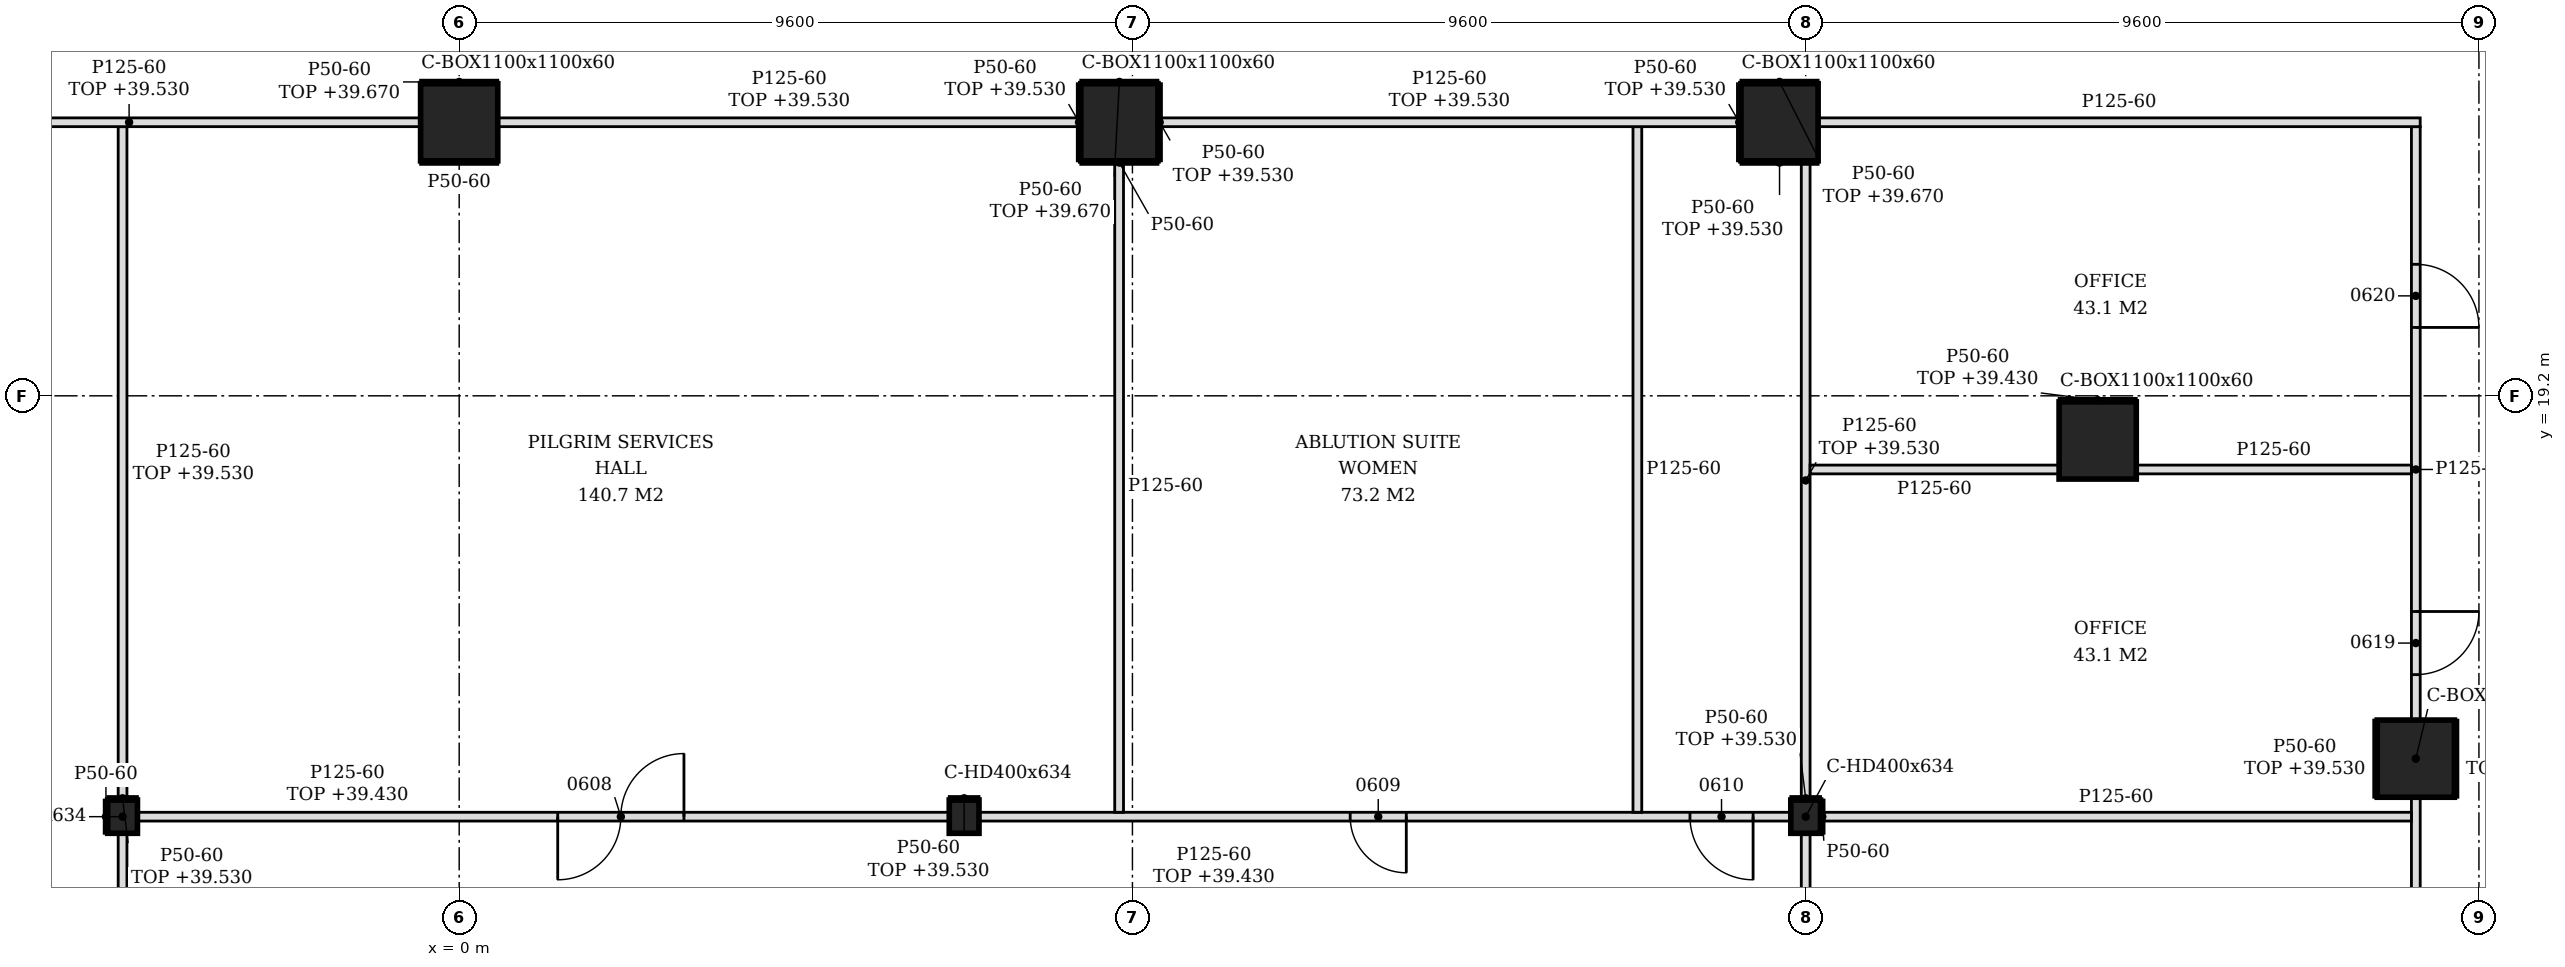
"""IFC4 building model, lengths in metres.
Left out: names, types, materials, properties, quantities, classifications, styles, units other than length and angle.
Written with IfcOpenShell. Run it as: python <this file> out.ifc"""

import sys

from ifc_helpers import new_model, si_unit, direction, frame, frame_2d, origin, origin_2d, place, context, subcontext, project, spatial, polyline, rectangle, hollow_rectangle, i_section, outline, extrude, element, fill, save


model = new_model("IFC4")
c1 = context("Model", 3, precision=1e-05, world=origin(), true_north=direction((0.0, 1.0)))
c2 = subcontext(c1, "Body", "Model", "MODEL_VIEW")
j1 = project(units=[si_unit("LENGTHUNIT", "METRE"), si_unit("PLANEANGLEUNIT", "RADIAN")], contexts=[c1])
p1 = place(None, origin())
s1 = spatial("IfcSite", under=j1, at=p1, CompositionType="ELEMENT")
p2 = place(p1, origin())
s2 = spatial("IfcBuilding", under=s1, at=p2, CompositionType="ELEMENT")
p3 = place(p2, frame((0.0, 0.0, 35.4)))
s3 = spatial("IfcBuildingStorey", under=s2, at=p3, CompositionType="ELEMENT", Elevation=35.4)
for number, where, z_axis, x_axis in (
    (1, (27.9, 14.027, -0.2), (0.0, 0.0, 1.0), (1.0, 0.0, 0.0)),
    (2, (23.364, 18.564, -0.2), (0.0, 0.0, 1.0), (1.0, 0.0, 0.0)),
    (3, (18.827, 23.1, -0.2), (0.0, 0.0, 1.0), (1.0, 0.0, 0.0)),
    (4, (9.414, 23.1, -0.2), (0.0, 0.0, 1.0), (1.0, 0.0, 0.0)),
    (5, (0.0, 23.1, -0.2), (0.0, 0.0, 1.0), (1.0, 0.0, 0.0)),
):
    element("IfcColumn", number, at=place(p3, frame(where, z_axis=z_axis, x_axis=x_axis)), inside=s3, PredefinedType="COLUMN", context=c2, shape_type="SweptSolid", body=[
        extrude(hollow_rectangle(XDim=1.1, YDim=1.1, WallThickness=0.06, at=origin_2d()), origin(), (0.0, 0.0, 1.0), 4.85),
    ])
for number, where, z_axis, x_axis in (
    (6, (-4.8, 13.2, -0.2), (0.0, 0.0, 1.0), (1.0, 0.0, 0.0)),
    (7, (7.2, 13.2, -0.2), (0.0, 0.0, 1.0), (1.0, 0.0, 0.0)),
    (8, (19.2, 13.2, -0.2), (0.0, 0.0, 1.0), (1.0, 0.0, 0.0)),
):
    element("IfcColumn", number, at=place(p3, frame(where, z_axis=z_axis, x_axis=x_axis)), inside=s3, PredefinedType="COLUMN", context=c2, shape_type="SweptSolid", body=[
        extrude(i_section(OverallWidth=0.424, OverallDepth=0.474, WebThickness=0.048, FlangeThickness=0.077, FilletRadius=0.015, at=origin_2d()), origin(), (0.0, 0.0, 1.0), 4.85),
    ])
for number, where, z_axis, x_axis in (
    (9, (-4.8, 7.863, 0.0), (0.0, 0.0, 1.0), (0.0, 1.0, 0.0)),
    (10, (19.2, 7.863, 0.0), (0.0, 0.0, 1.0), (0.0, 1.0, 0.0)),
):
    element("IfcWall", number, at=place(p3, frame(where, z_axis=z_axis, x_axis=x_axis)), inside=s3, PredefinedType="PARTITIONING", context=c2, shape_type="SweptSolid", body=[
        extrude(rectangle(XDim=5.1, YDim=0.125, at=frame_2d((2.55, 0.0))), origin(), (0.0, 0.0, 1.0), 4.03),
    ])
p4 = place(p3, frame((27.9, 7.863, 0.0), z_axis=(0.0, 0.0, 1.0), x_axis=(0.0, 1.0, 0.0)))
e11 = element("IfcWall", 11, at=p4, inside=s3, PredefinedType="PARTITIONING", context=c2, shape_type="SweptSolid", body=[
    extrude(rectangle(XDim=5.615, YDim=0.125, at=frame_2d((2.807, 0.0))), origin(), (0.0, 0.0, 1.0), 4.13),
])
p5 = place(p3, frame((-4.588, 13.2, 0.0), z_axis=(0.0, 0.0, 1.0), x_axis=(1.0, 0.0, 0.0)))
e12 = element("IfcWall", 12, at=p5, inside=s3, PredefinedType="PARTITIONING", context=c2, shape_type="SweptSolid", body=[
    extrude(rectangle(XDim=11.576, YDim=0.125, at=frame_2d((5.788, 0.0))), origin(), (0.0, 0.0, 1.0), 4.03),
])
p6 = place(p5, frame((5.993, 0.0, 0.0)))
e13 = element("IfcOpeningElement", 13, at=p6, cuts=e12, PredefinedType="OPENING", context=c2, shape_type="SweptSolid", body=[
    extrude(rectangle(XDim=1.8, YDim=2.1, at=frame_2d((0.9, 1.05))), frame((0.0, 0.073, 0.0), z_axis=(0.0, -1.0, 0.0), x_axis=(1.0, 0.0, 0.0)), (0.0, 0.0, 1.0), 0.145),
])
p7 = place(p3, frame((7.412, 13.2, 0.0), z_axis=(0.0, 0.0, 1.0), x_axis=(1.0, 0.0, 0.0)))
e14 = element("IfcWall", 14, at=p7, inside=s3, PredefinedType="PARTITIONING", context=c2, shape_type="SweptSolid", body=[
    extrude(rectangle(XDim=11.576, YDim=0.125, at=frame_2d((5.788, 0.0))), origin(), (0.0, 0.0, 1.0), 4.03),
])
p8 = place(p7, frame((5.293, 0.0, 0.0)))
e15 = element("IfcOpeningElement", 15, at=p8, cuts=e14, PredefinedType="OPENING", context=c2, shape_type="SweptSolid", body=[
    extrude(rectangle(XDim=0.8, YDim=2.1, at=frame_2d((0.4, 1.05))), frame((0.0, 0.073, 0.0), z_axis=(0.0, -1.0, 0.0), x_axis=(1.0, 0.0, 0.0)), (0.0, 0.0, 1.0), 0.145),
])
p9 = place(p7, frame((10.138, 0.0, 0.0)))
e16 = element("IfcOpeningElement", 16, at=p9, cuts=e14, PredefinedType="OPENING", context=c2, shape_type="SweptSolid", body=[
    extrude(rectangle(XDim=0.9, YDim=2.1, at=frame_2d((0.45, 1.05))), frame((0.0, 0.073, 0.0), z_axis=(0.0, -1.0, 0.0), x_axis=(1.0, 0.0, 0.0)), (0.0, 0.0, 1.0), 0.145),
])
p10 = place(p3, frame((19.412, 13.2, 0.0), z_axis=(0.0, 0.0, 1.0), x_axis=(1.0, 0.0, 0.0)))
e17 = element("IfcWall", 17, at=p10, inside=s3, PredefinedType="PARTITIONING", context=c2, shape_type="SweptSolid", body=[
    extrude(outline(polyline([(0.0, 0.0), (8.425, 0.0), (8.426, 4.13), (8.338, 4.13), (8.336, 4.65), (0.0, 4.65), (0.0, 0.0)])), frame((0.0, 0.062, 0.0), z_axis=(0.0, -1.0, 0.0), x_axis=(1.0, 0.0, 0.0)), (0.0, 0.0, 1.0), 0.125),
])
p11 = place(p3, frame((9.41, 13.262, 0.0), z_axis=(0.0, 0.0, 1.0), x_axis=(0.0, 1.0, 0.0)))
e18 = element("IfcWall", 18, at=p11, inside=s3, PredefinedType="PARTITIONING", context=c2, shape_type="SweptSolid", body=[
    extrude(outline(polyline([(0.0, 0.0), (9.288, 0.0), (9.288, 4.65), (6.042, 4.65), (6.041, 4.08), (5.833, 4.08), (5.831, 4.65), (0.087, 4.65), (0.085, 4.03), (0.0, 4.03), (0.0, 0.0)])), frame((0.0, 0.062, 0.0), z_axis=(0.0, -1.0, 0.0), x_axis=(1.0, 0.0, 0.0)), (0.0, 0.0, 1.0), 0.125),
])
p12 = place(p3, frame((16.8, 13.262, 0.0), z_axis=(0.0, 0.0, 1.0), x_axis=(0.0, 1.0, 0.0)))
e19 = element("IfcWall", 19, at=p12, inside=s3, PredefinedType="PARTITIONING", context=c2, shape_type="SweptSolid", body=[
    extrude(outline(polyline([(0.0, 0.0), (9.775, 0.0), (9.775, 4.13), (9.688, 4.13), (9.686, 4.65), (6.042, 4.65), (6.041, 4.08), (5.833, 4.08), (5.831, 4.65), (0.087, 4.65), (0.085, 4.03), (0.0, 4.03), (0.0, 0.0)])), frame((0.0, 0.062, 0.0), z_axis=(0.0, -1.0, 0.0), x_axis=(1.0, 0.0, 0.0)), (0.0, 0.0, 1.0), 0.125),
])
p13 = place(p3, frame((-4.8, 13.437, 0.0), z_axis=(0.0, 0.0, 1.0), x_axis=(0.0, 1.0, 0.0)))
e20 = element("IfcWall", 20, at=p13, inside=s3, PredefinedType="PARTITIONING", context=c2, shape_type="SweptSolid", body=[
    extrude(rectangle(XDim=9.601, YDim=0.125, at=frame_2d((4.8, 0.0))), origin(), (0.0, 0.0, 1.0), 4.13),
])
p14 = place(p3, frame((19.2, 13.437, 0.0), z_axis=(0.0, 0.0, 1.0), x_axis=(0.0, 1.0, 0.0)))
e21 = element("IfcWall", 21, at=p14, inside=s3, PredefinedType="PARTITIONING", context=c2, shape_type="SweptSolid", body=[
    extrude(rectangle(XDim=9.113, YDim=0.125, at=frame_2d((4.557, 0.0))), origin(), (0.0, 0.0, 1.0), 4.13),
])
p15 = place(p3, frame((27.9, 14.577, 0.0), z_axis=(0.0, 0.0, 1.0), x_axis=(0.0, 1.0, 0.0)))
e22 = element("IfcWall", 22, at=p15, inside=s3, PredefinedType="PARTITIONING", context=c2, shape_type="SweptSolid", body=[
    extrude(outline(polyline([(0.0, 0.0), (8.46, 0.0), (8.46, 4.65), (4.773, 4.65), (4.771, 4.03), (4.473, 4.03), (4.471, 4.65), (0.0, 4.65), (0.0, 0.0)])), frame((0.0, 0.062, 0.0), z_axis=(0.0, -1.0, 0.0), x_axis=(1.0, 0.0, 0.0)), (0.0, 0.0, 1.0), 0.125),
])
p16 = place(p15, frame((0.648, 0.0, 0.0)))
e23 = element("IfcOpeningElement", 23, at=p16, cuts=e22, PredefinedType="OPENING", context=c2, shape_type="SweptSolid", body=[
    extrude(rectangle(XDim=0.9, YDim=2.1, at=frame_2d((0.45, 1.05))), frame((0.0, 0.073, 0.0), z_axis=(0.0, -1.0, 0.0), x_axis=(1.0, 0.0, 0.0)), (0.0, 0.0, 1.0), 0.145),
])
p17 = place(p15, frame((5.598, 0.0, 0.0)))
e24 = element("IfcOpeningElement", 24, at=p17, cuts=e22, PredefinedType="OPENING", context=c2, shape_type="SweptSolid", body=[
    extrude(rectangle(XDim=0.9, YDim=2.1, at=frame_2d((0.45, 1.05))), frame((0.0, 0.073, 0.0), z_axis=(0.0, -1.0, 0.0), x_axis=(1.0, 0.0, 0.0)), (0.0, 0.0, 1.0), 0.145),
])
p18 = place(p3, frame((19.262, 18.15, 0.0), z_axis=(0.0, 0.0, 1.0), x_axis=(1.0, 0.0, 0.0)))
e25 = element("IfcWall", 25, at=p18, inside=s3, PredefinedType="PARTITIONING", context=c2, shape_type="SweptSolid", body=[
    extrude(outline(polyline([(0.0, 0.0), (3.551, 0.0), (3.551, 4.65), (0.087, 4.65), (0.085, 4.13), (0.0, 4.13), (0.0, 0.0)])), frame((0.0, 0.062, 0.0), z_axis=(0.0, -1.0, 0.0), x_axis=(1.0, 0.0, 0.0)), (0.0, 0.0, 1.0), 0.125),
])
p19 = place(p3, frame((23.914, 18.15, 0.0), z_axis=(0.0, 0.0, 1.0), x_axis=(1.0, 0.0, 0.0)))
e26 = element("IfcWall", 26, at=p19, inside=s3, PredefinedType="PARTITIONING", context=c2, shape_type="SweptSolid", body=[
    extrude(outline(polyline([(0.0, 0.0), (3.924, 0.0), (3.924, 4.65), (0.138, 4.65), (0.136, 4.13), (0.0, 4.13), (0.0, 0.0)])), frame((0.0, 0.062, 0.0), z_axis=(0.0, -1.0, 0.0), x_axis=(1.0, 0.0, 0.0)), (0.0, 0.0, 1.0), 0.125),
])
for number, where, z_axis, x_axis in (
    (27, (-8.864, 23.1, 0.0), (0.0, 0.0, 1.0), (1.0, 0.0, 0.0)),
    (28, (0.55, 23.1, 0.0), (0.0, 0.0, 1.0), (1.0, 0.0, 0.0)),
    (29, (9.964, 23.1, 0.0), (0.0, 0.0, 1.0), (1.0, 0.0, 0.0)),
):
    element("IfcWall", number, at=place(p3, frame(where, z_axis=z_axis, x_axis=x_axis)), inside=s3, PredefinedType="PARTITIONING", context=c2, shape_type="SweptSolid", body=[
        extrude(rectangle(XDim=8.313, YDim=0.125, at=frame_2d((4.157, 0.0))), origin(), (0.0, 0.0, 1.0), 4.13),
    ])
p20 = place(p3, frame((19.377, 23.1, 0.0), z_axis=(0.0, 0.0, 1.0), x_axis=(1.0, 0.0, 0.0)))
e30 = element("IfcWall", 30, at=p20, inside=s3, PredefinedType="PARTITIONING", context=c2, shape_type="SweptSolid", body=[
    extrude(rectangle(XDim=8.585, YDim=0.125, at=frame_2d((4.292, 0.0))), origin(), (0.0, 0.0, 1.0), 4.65),
])
for number, where, z_axis, x_axis in (
    (31, (-5.037, 12.963, 0.0), (0.0, 0.0, 1.0), (0.0, 1.0, 0.0)),
    (32, (19.437, 12.963, 0.0), (0.0, 0.0, 1.0), (0.0, 1.0, 0.0)),
):
    element("IfcWall", number, at=place(p3, frame(where, z_axis=z_axis, x_axis=x_axis)), inside=s3, PredefinedType="PARTITIONING", context=c2, shape_type="SweptSolid", body=[
        extrude(rectangle(XDim=0.474, YDim=0.05, at=frame_2d((0.237, 0.0))), origin(), (0.0, 0.0, 1.0), 4.65),
    ])
for number, where, z_axis, x_axis in (
    (33, (27.325, 13.477, 0.0), (0.0, 0.0, 1.0), (0.0, 1.0, 0.0)),
    (34, (28.475, 13.477, 0.0), (0.0, 0.0, 1.0), (0.0, 1.0, 0.0)),
):
    element("IfcWall", number, at=place(p3, frame(where, z_axis=z_axis, x_axis=x_axis)), inside=s3, PredefinedType="PARTITIONING", context=c2, shape_type="SweptSolid", body=[
        extrude(rectangle(XDim=1.1, YDim=0.05, at=frame_2d((0.55, 0.0))), origin(), (0.0, 0.0, 1.0), 4.13),
    ])
for number, where, z_axis, x_axis in (
    (35, (-5.012, 13.462, 0.0), (0.0, 0.0, 1.0), (1.0, 0.0, 0.0)),
    (36, (6.988, 13.462, 0.0), (0.0, 0.0, 1.0), (1.0, 0.0, 0.0)),
    (37, (18.988, 13.462, 0.0), (0.0, 0.0, 1.0), (1.0, 0.0, 0.0)),
):
    element("IfcWall", number, at=place(p3, frame(where, z_axis=z_axis, x_axis=x_axis)), inside=s3, PredefinedType="PARTITIONING", context=c2, shape_type="SweptSolid", body=[
        extrude(rectangle(XDim=0.424, YDim=0.05, at=frame_2d((0.212, 0.0))), origin(), (0.0, 0.0, 1.0), 4.13),
    ])
for number, where, z_axis, x_axis in (
    (38, (9.989, 22.55, 0.0), (0.0, 0.0, 1.0), (0.0, 1.0, 0.0)),
    (39, (8.839, 22.55, 0.0), (0.0, 0.0, 1.0), (0.0, 1.0, 0.0)),
    (40, (18.252, 22.55, 0.0), (0.0, 0.0, 1.0), (0.0, 1.0, 0.0)),
):
    element("IfcWall", number, at=place(p3, frame(where, z_axis=z_axis, x_axis=x_axis)), inside=s3, PredefinedType="PARTITIONING", context=c2, shape_type="SweptSolid", body=[
        extrude(rectangle(XDim=1.1, YDim=0.05, at=frame_2d((0.55, 0.0))), origin(), (0.0, 0.0, 1.0), 4.13),
    ])
p21 = place(p3, frame((22.814, 19.139, 0.0), z_axis=(0.0, 0.0, 1.0), x_axis=(1.0, 0.0, 0.0)))
e41 = element("IfcWall", 41, at=p21, inside=s3, PredefinedType="PARTITIONING", context=c2, shape_type="SweptSolid", body=[
    extrude(rectangle(XDim=1.1, YDim=0.05, at=frame_2d((0.55, 0.0))), origin(), (0.0, 0.0, 1.0), 4.03),
])
p22 = place(p3, frame((-0.55, 22.525, 0.0), z_axis=(0.0, 0.0, 1.0), x_axis=(1.0, 0.0, 0.0)))
e42 = element("IfcWall", 42, at=p22, inside=s3, PredefinedType="PARTITIONING", context=c2, shape_type="SweptSolid", body=[
    extrude(rectangle(XDim=1.1, YDim=0.05, at=frame_2d((0.55, 0.0))), origin(), (0.0, 0.0, 1.0), 4.65),
])
for number, where, z_axis, x_axis in (
    (43, (-0.55, 23.675, 0.0), (0.0, 0.0, 1.0), (1.0, 0.0, 0.0)),
    (44, (8.864, 23.675, 0.0), (0.0, 0.0, 1.0), (1.0, 0.0, 0.0)),
):
    element("IfcWall", number, at=place(p3, frame(where, z_axis=z_axis, x_axis=x_axis)), inside=s3, PredefinedType="PARTITIONING", context=c2, shape_type="SweptSolid", body=[
        extrude(rectangle(XDim=1.1, YDim=0.05, at=frame_2d((0.55, 0.0))), origin(), (0.0, 0.0, 1.0), 4.27),
    ])
p23 = place(p3, frame((8.864, 22.525, 0.0), z_axis=(0.0, 0.0, 1.0), x_axis=(1.0, 0.0, 0.0)))
e45 = element("IfcWall", 45, at=p23, inside=s3, PredefinedType="PARTITIONING", context=c2, shape_type="SweptSolid", body=[
    extrude(rectangle(XDim=1.1, YDim=0.05, at=frame_2d((0.55, 0.0))), origin(), (0.0, 0.0, 1.0), 4.65),
])
p24 = place(p3, frame((18.277, 22.525, 0.0), z_axis=(0.0, 0.0, 1.0), x_axis=(1.0, 0.0, 0.0)))
e46 = element("IfcWall", 46, at=p24, inside=s3, PredefinedType="PARTITIONING", context=c2, shape_type="SweptSolid", body=[
    extrude(rectangle(XDim=1.1, YDim=0.05, at=frame_2d((0.55, 0.0))), origin(), (0.0, 0.0, 1.0), 4.13),
])
p25 = place(p3, frame((18.277, 23.675, 0.0), z_axis=(0.0, 0.0, 1.0), x_axis=(1.0, 0.0, 0.0)))
e47 = element("IfcWall", 47, at=p25, inside=s3, PredefinedType="PARTITIONING", context=c2, shape_type="SweptSolid", body=[
    extrude(rectangle(XDim=1.1, YDim=0.05, at=frame_2d((0.55, 0.0))), origin(), (0.0, 0.0, 1.0), 4.27),
])
p26 = place(p6, frame((1.8, 0.0, 0.0), z_axis=(0.0, 0.0, 1.0), x_axis=(-1.0, 0.0, 0.0)))
e48 = element("IfcDoor", 48, at=p26, inside=s3, OperationType="DOUBLE_DOOR_SINGLE_SWING", PredefinedType="DOOR", context=c2, shape_type="SweptSolid", body=[
    extrude(rectangle(XDim=1.8, YDim=2.1, at=frame_2d((0.9, 1.05))), frame((0.0, 0.025, 0.0), z_axis=(0.0, -1.0, 0.0), x_axis=(1.0, 0.0, 0.0)), (0.0, 0.0, 1.0), 0.05),
])
fill(e13, e48)
p27 = place(p8, frame((0.8, 0.0, 0.0), z_axis=(0.0, 0.0, 1.0), x_axis=(-1.0, 0.0, 0.0)))
e49 = element("IfcDoor", 49, at=p27, inside=s3, OperationType="SINGLE_SWING_LEFT", PredefinedType="DOOR", context=c2, shape_type="SweptSolid", body=[
    extrude(rectangle(XDim=0.8, YDim=2.1, at=frame_2d((0.4, 1.05))), frame((0.0, 0.025, 0.0), z_axis=(0.0, -1.0, 0.0), x_axis=(1.0, 0.0, 0.0)), (0.0, 0.0, 1.0), 0.05),
])
fill(e15, e49)
p28 = place(p9, frame((0.9, 0.0, 0.0), z_axis=(0.0, 0.0, 1.0), x_axis=(-1.0, 0.0, 0.0)))
e50 = element("IfcDoor", 50, at=p28, inside=s3, OperationType="SINGLE_SWING_LEFT", PredefinedType="DOOR", context=c2, shape_type="SweptSolid", body=[
    extrude(rectangle(XDim=0.9, YDim=2.1, at=frame_2d((0.45, 1.05))), frame((0.0, 0.025, 0.0), z_axis=(0.0, -1.0, 0.0), x_axis=(1.0, 0.0, 0.0)), (0.0, 0.0, 1.0), 0.05),
])
fill(e16, e50)
p29 = place(p16, frame((0.9, 0.0, 0.0), z_axis=(0.0, 0.0, 1.0), x_axis=(-1.0, 0.0, 0.0)))
e51 = element("IfcDoor", 51, at=p29, inside=s3, OperationType="SINGLE_SWING_LEFT", PredefinedType="DOOR", context=c2, shape_type="SweptSolid", body=[
    extrude(rectangle(XDim=0.9, YDim=2.1, at=frame_2d((0.45, 1.05))), frame((0.0, 0.025, 0.0), z_axis=(0.0, -1.0, 0.0), x_axis=(1.0, 0.0, 0.0)), (0.0, 0.0, 1.0), 0.05),
])
fill(e23, e51)
p30 = place(p17, frame((0.9, 0.0, 0.0), z_axis=(0.0, 0.0, 1.0), x_axis=(-1.0, 0.0, 0.0)))
e52 = element("IfcDoor", 52, at=p30, inside=s3, OperationType="SINGLE_SWING_RIGHT", PredefinedType="DOOR", context=c2, shape_type="SweptSolid", body=[
    extrude(rectangle(XDim=0.9, YDim=2.1, at=frame_2d((0.45, 1.05))), frame((0.0, 0.025, 0.0), z_axis=(0.0, -1.0, 0.0), x_axis=(1.0, 0.0, 0.0)), (0.0, 0.0, 1.0), 0.05),
])
fill(e24, e52)
save(model, sys.argv[1])
